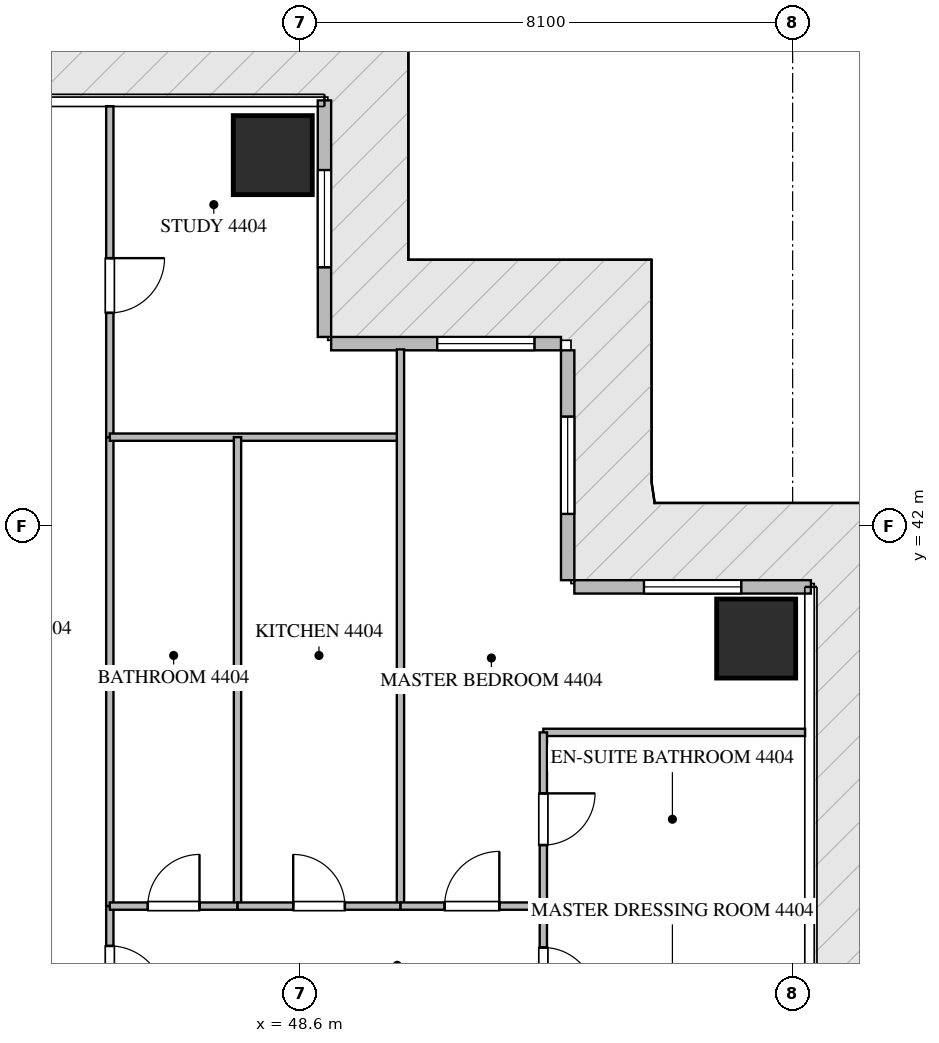
"""IFC4 building model, lengths in metres.
Left out: names, types, materials, properties, quantities, classifications, styles, units other than length and angle.
Written with IfcOpenShell. Run it as: python <this file> out.ifc"""

import sys

from ifc_helpers import new_model, si_unit, direction, frame, frame_2d, origin, origin_2d, place, context, subcontext, project, spatial, rectangle, extrude, source, transform, mapped, element, fill, save


model = new_model("IFC4")
c1 = context("Model", 3, precision=1e-05, world=origin(), true_north=direction((0.0, 1.0)))
c2 = subcontext(c1, "Body", "Model", "MODEL_VIEW")
j1 = project(units=[si_unit("LENGTHUNIT", "METRE"), si_unit("PLANEANGLEUNIT", "RADIAN")], contexts=[c1])
p1 = place(None, origin())
s1 = spatial("IfcSite", under=j1, at=p1, CompositionType="ELEMENT")
p2 = place(p1, origin())
s2 = spatial("IfcBuilding", under=s1, at=p2, CompositionType="ELEMENT")
p3 = place(p2, frame((0.0, 0.0, 176.4)))
s3 = spatial("IfcBuildingStorey", under=s2, at=p3, CompositionType="ELEMENT", Elevation=176.4)
m1 = source(origin(), c2, "Body", "SweptSolid", [
    extrude(rectangle(XDim=1.3, YDim=1.3, at=origin_2d()), origin(), (0.0, 0.0, 1.0), 3.75),
])
for number, where, z_axis, x_axis in (
    (1, (48.15, 48.1, -0.26), (0.0, 0.0, 1.0), (1.0, 0.0, 0.0)),
    (2, (56.1, 40.15, -0.26), (0.0, 0.0, 1.0), (1.0, 0.0, 0.0)),
):
    element("IfcColumn", number, at=place(p3, frame(where, z_axis=z_axis, x_axis=x_axis)), inside=s3, PredefinedType="COLUMN", context=c2, shape_type="MappedRepresentation", body=[
        mapped(m1, transform((0.0, 0.0, 0.0), scale=1.0)),
    ])
p4 = place(p3, frame((57.0, 41.0, 0.0), z_axis=(0.0, 0.0, 1.0), x_axis=(-1.0, 0.0, 0.0)))
e3 = element("IfcWall", 3, at=p4, inside=s3, PredefinedType="ELEMENTEDWALL", context=c2, shape_type="SweptSolid", body=[
    extrude(rectangle(XDim=3.89, YDim=0.22, at=frame_2d((1.945, 0.0))), origin(), (0.0, 0.0, 1.0), 3.475),
])
p5 = place(p4, frame((1.145, 0.0, 0.65)))
e4 = element("IfcOpeningElement", 4, at=p5, cuts=e3, PredefinedType="OPENING", context=c2, shape_type="SweptSolid", body=[
    extrude(rectangle(XDim=1.6, YDim=2.1, at=frame_2d((0.8, 1.05))), frame((0.0, 0.12, 0.0), z_axis=(0.0, -1.0, 0.0), x_axis=(1.0, 0.0, 0.0)), (0.0, 0.0, 1.0), 0.24),
])
p6 = place(p3, frame((53.0, 41.11, 0.0), z_axis=(0.0, 0.0, 1.0), x_axis=(0.0, 1.0, 0.0)))
e5 = element("IfcWall", 5, at=p6, inside=s3, PredefinedType="ELEMENTEDWALL", context=c2, shape_type="SweptSolid", body=[
    extrude(rectangle(XDim=3.78, YDim=0.22, at=frame_2d((1.89, 0.0))), origin(), (0.0, 0.0, 1.0), 3.475),
])
p7 = place(p6, frame((1.09, 0.0, 0.65)))
e6 = element("IfcOpeningElement", 6, at=p7, cuts=e5, PredefinedType="OPENING", context=c2, shape_type="SweptSolid", body=[
    extrude(rectangle(XDim=1.6, YDim=2.1, at=frame_2d((0.8, 1.05))), frame((0.0, 0.12, 0.0), z_axis=(0.0, -1.0, 0.0), x_axis=(1.0, 0.0, 0.0)), (0.0, 0.0, 1.0), 0.24),
])
p8 = place(p3, frame((52.89, 45.0, 0.0), z_axis=(0.0, 0.0, 1.0), x_axis=(-1.0, 0.0, 0.0)))
e7 = element("IfcWall", 7, at=p8, inside=s3, PredefinedType="ELEMENTEDWALL", context=c2, shape_type="SweptSolid", body=[
    extrude(rectangle(XDim=3.78, YDim=0.22, at=frame_2d((1.89, 0.0))), origin(), (0.0, 0.0, 1.0), 3.475),
])
p9 = place(p8, frame((0.436, 0.0, 0.65)))
e8 = element("IfcOpeningElement", 8, at=p9, cuts=e7, PredefinedType="OPENING", context=c2, shape_type="SweptSolid", body=[
    extrude(rectangle(XDim=1.6, YDim=2.1, at=frame_2d((0.8, 1.05))), frame((0.0, 0.12, 0.0), z_axis=(0.0, -1.0, 0.0), x_axis=(1.0, 0.0, 0.0)), (0.0, 0.0, 1.0), 0.24),
])
p10 = place(p3, frame((49.0, 45.11, 0.0), z_axis=(0.0, 0.0, 1.0), x_axis=(0.0, 1.0, 0.0)))
e9 = element("IfcWall", 9, at=p10, inside=s3, PredefinedType="ELEMENTEDWALL", context=c2, shape_type="SweptSolid", body=[
    extrude(rectangle(XDim=3.89, YDim=0.22, at=frame_2d((1.945, 0.0))), origin(), (0.0, 0.0, 1.0), 3.475),
])
p11 = place(p10, frame((1.145, 0.0, 0.65)))
e10 = element("IfcOpeningElement", 10, at=p11, cuts=e9, PredefinedType="OPENING", context=c2, shape_type="SweptSolid", body=[
    extrude(rectangle(XDim=1.6, YDim=2.1, at=frame_2d((0.8, 1.05))), frame((0.0, 0.12, 0.0), z_axis=(0.0, -1.0, 0.0), x_axis=(1.0, 0.0, 0.0)), (0.0, 0.0, 1.0), 0.24),
])
p12 = place(p3, frame((45.47, 35.75, 0.0), z_axis=(0.0, 0.0, 1.0), x_axis=(0.0, -1.0, 0.0)))
e11 = element("IfcWall", 11, at=p12, inside=s3, PredefinedType="PARTITIONING", context=c2, shape_type="SweptSolid", body=[
    extrude(rectangle(XDim=2.21, YDim=0.12, at=frame_2d((1.105, 0.0))), origin(), (0.0, 0.0, 1.0), 3.49),
])
p13 = place(p12, frame((0.655, 0.0, 0.0)))
e12 = element("IfcOpeningElement", 12, at=p13, cuts=e11, PredefinedType="OPENING", context=c2, shape_type="SweptSolid", body=[
    extrude(rectangle(XDim=0.9, YDim=2.1, at=frame_2d((0.45, 1.05))), frame((0.0, 0.07, 0.0), z_axis=(0.0, -1.0, 0.0), x_axis=(1.0, 0.0, 0.0)), (0.0, 0.0, 1.0), 0.14),
])
p14 = place(p3, frame((45.47, 48.905, 0.0), z_axis=(0.0, 0.0, 1.0), x_axis=(0.0, -1.0, 0.0)))
e13 = element("IfcWall", 13, at=p14, inside=s3, PredefinedType="PARTITIONING", context=c2, shape_type="SweptSolid", body=[
    extrude(rectangle(XDim=5.443, YDim=0.12, at=frame_2d((2.722, 0.0))), origin(), (0.0, 0.0, 1.0), 3.49),
])
p15 = place(p14, frame((2.499, 0.0, 0.0)))
e14 = element("IfcOpeningElement", 14, at=p15, cuts=e13, PredefinedType="OPENING", context=c2, shape_type="SweptSolid", body=[
    extrude(rectangle(XDim=0.9, YDim=2.1, at=frame_2d((0.45, 1.05))), frame((0.0, 0.07, 0.0), z_axis=(0.0, -1.0, 0.0), x_axis=(1.0, 0.0, 0.0)), (0.0, 0.0, 1.0), 0.14),
])
p16 = place(p3, frame((45.47, 43.46, 0.0), z_axis=(0.0, 0.0, 1.0), x_axis=(0.0, -1.0, 0.0)))
e15 = element("IfcWall", 15, at=p16, inside=s3, PredefinedType="PARTITIONING", context=c2, shape_type="SweptSolid", body=[
    extrude(rectangle(XDim=7.708, YDim=0.12, at=frame_2d((3.854, 0.0))), origin(), (0.0, 0.0, 1.0), 3.49),
])
p17 = place(p3, frame((45.47, 43.462, 0.0), z_axis=(0.0, 0.0, 1.0), x_axis=(1.0, 0.0, 0.0)))
e16 = element("IfcWall", 16, at=p17, inside=s3, PredefinedType="PARTITIONING", context=c2, shape_type="SweptSolid", body=[
    extrude(rectangle(XDim=4.78, YDim=0.12, at=frame_2d((2.39, 0.0))), origin(), (0.0, 0.0, 1.0), 3.49),
])
p18 = place(p3, frame((50.25, 44.905, 0.0), z_axis=(0.0, 0.0, 1.0), x_axis=(0.0, -1.0, 0.0)))
e17 = element("IfcWall", 17, at=p18, inside=s3, PredefinedType="PARTITIONING", context=c2, shape_type="SweptSolid", body=[
    extrude(rectangle(XDim=9.155, YDim=0.12, at=frame_2d((4.578, 0.0))), origin(), (0.0, 0.0, 1.0), 3.49),
])
p19 = place(p3, frame((47.57, 43.462, 0.0), z_axis=(0.0, 0.0, 1.0), x_axis=(0.0, -1.0, 0.0)))
e18 = element("IfcWall", 18, at=p19, inside=s3, PredefinedType="PARTITIONING", context=c2, shape_type="SweptSolid", body=[
    extrude(rectangle(XDim=7.712, YDim=0.12, at=frame_2d((3.856, 0.0))), origin(), (0.0, 0.0, 1.0), 3.49),
])
p20 = place(p3, frame((45.47, 35.75, 0.0), z_axis=(0.0, 0.0, 1.0), x_axis=(1.0, 0.0, 0.0)))
e19 = element("IfcWall", 19, at=p20, inside=s3, PredefinedType="PARTITIONING", context=c2, shape_type="SweptSolid", body=[
    extrude(rectangle(XDim=2.1, YDim=0.12, at=frame_2d((1.05, 0.0))), origin(), (0.0, 0.0, 1.0), 3.49),
])
p21 = place(p20, frame((0.625, 0.0, 0.0)))
e20 = element("IfcOpeningElement", 20, at=p21, cuts=e19, PredefinedType="OPENING", context=c2, shape_type="SweptSolid", body=[
    extrude(rectangle(XDim=0.85, YDim=2.1, at=frame_2d((0.425, 1.05))), frame((0.0, 0.07, 0.0), z_axis=(0.0, -1.0, 0.0), x_axis=(1.0, 0.0, 0.0)), (0.0, 0.0, 1.0), 0.14),
])
p22 = place(p3, frame((47.572, 35.75, 0.0), z_axis=(0.0, 0.0, 1.0), x_axis=(1.0, 0.0, 0.0)))
e21 = element("IfcWall", 21, at=p22, inside=s3, PredefinedType="PARTITIONING", context=c2, shape_type="SweptSolid", body=[
    extrude(rectangle(XDim=2.678, YDim=0.12, at=frame_2d((1.339, 0.0))), origin(), (0.0, 0.0, 1.0), 3.49),
])
p23 = place(p22, frame((0.914, 0.0, 0.0)))
e22 = element("IfcOpeningElement", 22, at=p23, cuts=e21, PredefinedType="OPENING", context=c2, shape_type="SweptSolid", body=[
    extrude(rectangle(XDim=0.85, YDim=2.1, at=frame_2d((0.425, 1.05))), frame((0.0, 0.07, 0.0), z_axis=(0.0, -1.0, 0.0), x_axis=(1.0, 0.0, 0.0)), (0.0, 0.0, 1.0), 0.14),
])
p24 = place(p3, frame((50.252, 35.75, 0.0), z_axis=(0.0, 0.0, 1.0), x_axis=(1.0, 0.0, 0.0)))
e23 = element("IfcWall", 23, at=p24, inside=s3, PredefinedType="PARTITIONING", context=c2, shape_type="SweptSolid", body=[
    extrude(rectangle(XDim=2.348, YDim=0.12, at=frame_2d((1.174, 0.0))), origin(), (0.0, 0.0, 1.0), 3.49),
])
p25 = place(p24, frame((0.724, 0.0, 0.0)))
e24 = element("IfcOpeningElement", 24, at=p25, cuts=e23, PredefinedType="OPENING", context=c2, shape_type="SweptSolid", body=[
    extrude(rectangle(XDim=0.9, YDim=2.1, at=frame_2d((0.45, 1.05))), frame((0.0, 0.07, 0.0), z_axis=(0.0, -1.0, 0.0), x_axis=(1.0, 0.0, 0.0)), (0.0, 0.0, 1.0), 0.14),
])
p26 = place(p3, frame((52.6, 38.607, 0.0), z_axis=(0.0, 0.0, 1.0), x_axis=(1.0, 0.0, 0.0)))
e25 = element("IfcWall", 25, at=p26, inside=s3, PredefinedType="PARTITIONING", context=c2, shape_type="SweptSolid", body=[
    extrude(rectangle(XDim=4.305, YDim=0.12, at=frame_2d((2.152, 0.0))), origin(), (0.0, 0.0, 1.0), 3.49),
])
p27 = place(p3, frame((52.602, 35.75, 0.0), z_axis=(0.0, 0.0, 1.0), x_axis=(1.0, 0.0, 0.0)))
e26 = element("IfcWall", 26, at=p27, inside=s3, PredefinedType="PARTITIONING", context=c2, shape_type="SweptSolid", body=[
    extrude(rectangle(XDim=4.303, YDim=0.12, at=frame_2d((2.151, 0.0))), origin(), (0.0, 0.0, 1.0), 3.49),
])
p28 = place(p3, frame((52.6, 38.607, 0.0), z_axis=(0.0, 0.0, 1.0), x_axis=(0.0, -1.0, 0.0)))
e27 = element("IfcWall", 27, at=p28, inside=s3, PredefinedType="PARTITIONING", context=c2, shape_type="SweptSolid", body=[
    extrude(rectangle(XDim=2.857, YDim=0.12, at=frame_2d((1.428, 0.0))), origin(), (0.0, 0.0, 1.0), 3.49),
])
p29 = place(p28, frame((1.003, 0.0, 0.0)))
e28 = element("IfcOpeningElement", 28, at=p29, cuts=e27, PredefinedType="OPENING", context=c2, shape_type="SweptSolid", body=[
    extrude(rectangle(XDim=0.85, YDim=2.1, at=frame_2d((0.425, 1.05))), frame((0.0, 0.07, 0.0), z_axis=(0.0, -1.0, 0.0), x_axis=(1.0, 0.0, 0.0)), (0.0, 0.0, 1.0), 0.14),
])
p30 = place(p3, frame((52.6, 35.748, 0.0), z_axis=(0.0, 0.0, 1.0), x_axis=(0.0, -1.0, 0.0)))
e29 = element("IfcWall", 29, at=p30, inside=s3, PredefinedType="PARTITIONING", context=c2, shape_type="SweptSolid", body=[
    extrude(rectangle(XDim=2.208, YDim=0.12, at=frame_2d((1.104, 0.0))), origin(), (0.0, 0.0, 1.0), 3.49),
])
p31 = place(p30, frame((0.679, 0.0, 0.0)))
e30 = element("IfcOpeningElement", 30, at=p31, cuts=e29, PredefinedType="OPENING", context=c2, shape_type="SweptSolid", body=[
    extrude(rectangle(XDim=0.85, YDim=2.1, at=frame_2d((0.425, 1.05))), frame((0.0, 0.07, 0.0), z_axis=(0.0, -1.0, 0.0), x_axis=(1.0, 0.0, 0.0)), (0.0, 0.0, 1.0), 0.14),
])
m2 = source(origin(), c2, "Body", "SweptSolid", [
    extrude(rectangle(XDim=1.6, YDim=2.1, at=frame_2d((0.8, 1.05))), frame((0.0, 0.03, 0.0), z_axis=(0.0, -1.0, 0.0), x_axis=(1.0, 0.0, 0.0)), (0.0, 0.0, 1.0), 0.06),
])
p32 = place(p5, origin())
e31 = element("IfcWindow", 31, at=p32, inside=s3, PartitioningType="SINGLE_PANEL", PredefinedType="WINDOW", context=c2, shape_type="MappedRepresentation", body=[
    mapped(m2, transform((0.0, 0.0, 0.0), scale=1.0)),
])
fill(e4, e31)
p33 = place(p7, origin())
e32 = element("IfcWindow", 32, at=p33, inside=s3, PartitioningType="SINGLE_PANEL", PredefinedType="WINDOW", context=c2, shape_type="MappedRepresentation", body=[
    mapped(m2, transform((0.0, 0.0, 0.0), scale=1.0)),
])
fill(e6, e32)
p34 = place(p9, origin())
e33 = element("IfcWindow", 33, at=p34, inside=s3, PartitioningType="SINGLE_PANEL", PredefinedType="WINDOW", context=c2, shape_type="MappedRepresentation", body=[
    mapped(m2, transform((0.0, 0.0, 0.0), scale=1.0)),
])
fill(e8, e33)
p35 = place(p11, origin())
e34 = element("IfcWindow", 34, at=p35, inside=s3, PartitioningType="SINGLE_PANEL", PredefinedType="WINDOW", context=c2, shape_type="MappedRepresentation", body=[
    mapped(m2, transform((0.0, 0.0, 0.0), scale=1.0)),
])
fill(e10, e34)
m3 = source(origin(), c2, "Body", "SweptSolid", [
    extrude(rectangle(XDim=0.9, YDim=2.1, at=frame_2d((0.45, 1.05))), frame((0.0, 0.025, 0.0), z_axis=(0.0, -1.0, 0.0), x_axis=(1.0, 0.0, 0.0)), (0.0, 0.0, 1.0), 0.05),
])
p36 = place(p13, origin())
e35 = element("IfcDoor", 35, at=p36, inside=s3, OperationType="SINGLE_SWING_RIGHT", PredefinedType="DOOR", context=c2, shape_type="MappedRepresentation", body=[
    mapped(m3, transform((0.0, 0.0, 0.0), scale=1.0)),
])
fill(e12, e35)
p37 = place(p15, origin())
e36 = element("IfcDoor", 36, at=p37, inside=s3, OperationType="SINGLE_SWING_LEFT", PredefinedType="DOOR", context=c2, shape_type="MappedRepresentation", body=[
    mapped(m3, transform((0.0, 0.0, 0.0), scale=1.0)),
])
fill(e14, e36)
m4 = source(origin(), c2, "Body", "SweptSolid", [
    extrude(rectangle(XDim=0.85, YDim=2.1, at=frame_2d((0.425, 1.05))), frame((0.0, 0.025, 0.0), z_axis=(0.0, -1.0, 0.0), x_axis=(1.0, 0.0, 0.0)), (0.0, 0.0, 1.0), 0.05),
])
p38 = place(p21, origin())
e37 = element("IfcDoor", 37, at=p38, inside=s3, OperationType="SINGLE_SWING_RIGHT", PredefinedType="DOOR", context=c2, shape_type="MappedRepresentation", body=[
    mapped(m4, transform((0.0, 0.0, 0.0), scale=1.0)),
])
fill(e20, e37)
p39 = place(p23, origin())
e38 = element("IfcDoor", 38, at=p39, inside=s3, OperationType="SINGLE_SWING_LEFT", PredefinedType="DOOR", context=c2, shape_type="MappedRepresentation", body=[
    mapped(m4, transform((0.0, 0.0, 0.0), scale=1.0)),
])
fill(e22, e38)
p40 = place(p25, origin())
e39 = element("IfcDoor", 39, at=p40, inside=s3, OperationType="SINGLE_SWING_RIGHT", PredefinedType="DOOR", context=c2, shape_type="MappedRepresentation", body=[
    mapped(m3, transform((0.0, 0.0, 0.0), scale=1.0)),
])
fill(e24, e39)
p41 = place(p29, origin())
e40 = element("IfcDoor", 40, at=p41, inside=s3, OperationType="SINGLE_SWING_LEFT", PredefinedType="DOOR", context=c2, shape_type="MappedRepresentation", body=[
    mapped(m4, transform((0.0, 0.0, 0.0), scale=1.0)),
])
fill(e28, e40)
p42 = place(p31, origin())
e41 = element("IfcDoor", 41, at=p42, inside=s3, OperationType="SINGLE_SWING_RIGHT", PredefinedType="DOOR", context=c2, shape_type="MappedRepresentation", body=[
    mapped(m4, transform((0.0, 0.0, 0.0), scale=1.0)),
])
fill(e30, e41)
save(model, sys.argv[1])
